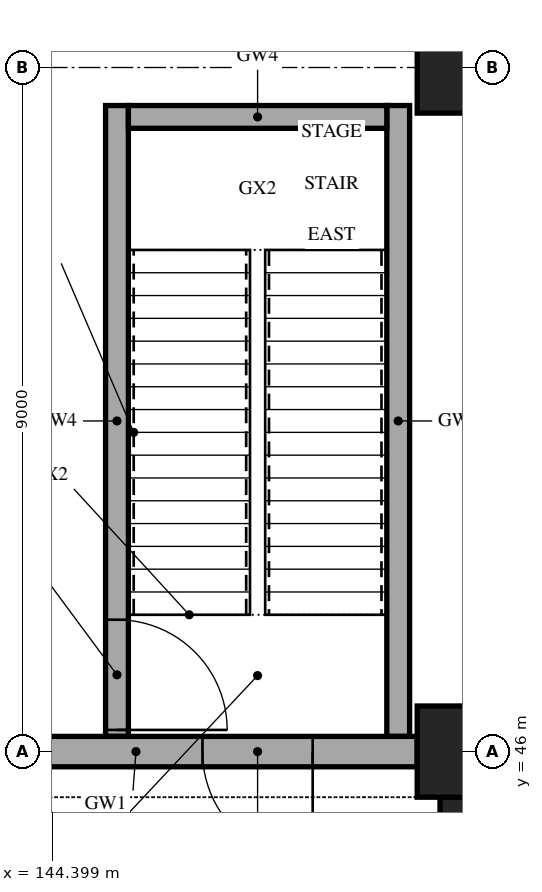
"""IFC4 building model, lengths in metres.
Left out: names, types, materials, properties, quantities, classifications, styles, units other than length and angle.
Written with IfcOpenShell. Run it as: python <this file> out.ifc"""

import sys

from ifc_helpers import new_model, si_unit, direction, frame, frame_2d, origin, origin_2d, place, context, subcontext, project, spatial, rectangle, extrude, element, fill, save


model = new_model("IFC4")
c1 = context("Model", 3, precision=1e-05, world=origin(), true_north=direction((0.0, 1.0)))
c2 = subcontext(c1, "Body", "Model", "MODEL_VIEW")
j1 = project(units=[si_unit("LENGTHUNIT", "METRE"), si_unit("PLANEANGLEUNIT", "RADIAN")], contexts=[c1])
p1 = place(None, origin())
s1 = spatial("IfcSite", under=j1, at=p1, CompositionType="ELEMENT")
p2 = place(p1, origin())
s2 = spatial("IfcBuilding", under=s1, at=p2, CompositionType="ELEMENT")
p3 = place(p2, origin())
s3 = spatial("IfcBuildingStorey", under=s2, at=p3, CompositionType="ELEMENT", Elevation=0.0)
p4 = place(p3, frame((150.0, 44.9, -0.3), z_axis=(0.0, 0.0, 1.0), x_axis=(1.0, 0.0, 0.0)))
e1 = element("IfcColumn", 1, at=p4, inside=s3, PredefinedType="COLUMN", context=c2, shape_type="SweptSolid", body=[
    extrude(rectangle(XDim=1.0, YDim=1.0, at=origin_2d()), origin(), (0.0, 0.0, 1.0), 5.3),
])
for number, where, z_axis, x_axis in (
    (2, (150.0, 46.0, 0.0), (0.0, 0.0, 1.0), (1.0, 0.0, 0.0)),
    (3, (150.0, 55.0, 0.0), (0.0, 0.0, 1.0), (1.0, 0.0, 0.0)),
):
    element("IfcColumn", number, at=place(p3, frame(where, z_axis=z_axis, x_axis=x_axis)), inside=s3, PredefinedType="COLUMN", context=c2, shape_type="SweptSolid", body=[
        extrude(rectangle(XDim=1.6, YDim=1.2, at=origin_2d()), origin(), (0.0, 0.0, 1.0), 5.0),
    ])
p5 = place(p3, frame((145.25, 46.2, 0.0), z_axis=(0.0, 0.0, 1.0), x_axis=(0.0, 1.0, 0.0)))
e4 = element("IfcWall", 4, at=p5, inside=s3, PredefinedType="SHEAR", context=c2, shape_type="SweptSolid", body=[
    extrude(rectangle(XDim=8.3, YDim=0.3, at=frame_2d((4.15, 0.0))), origin(), (0.0, 0.0, 1.0), 5.0),
])
p6 = place(p5, frame((0.085, 0.0, 0.0)))
e5 = element("IfcOpeningElement", 5, at=p6, cuts=e4, PredefinedType="OPENING", context=c2, shape_type="SweptSolid", body=[
    extrude(rectangle(XDim=1.45, YDim=2.1, at=frame_2d((0.725, 1.05))), frame((0.0, 0.16, 0.0), z_axis=(0.0, -1.0, 0.0), x_axis=(1.0, 0.0, 0.0)), (0.0, 0.0, 1.0), 0.32),
])
p7 = place(p3, frame((148.95, 46.2, 0.0), z_axis=(0.0, 0.0, 1.0), x_axis=(0.0, 1.0, 0.0)))
e6 = element("IfcWall", 6, at=p7, inside=s3, PredefinedType="SHEAR", context=c2, shape_type="SweptSolid", body=[
    extrude(rectangle(XDim=8.3, YDim=0.3, at=frame_2d((4.15, 0.0))), origin(), (0.0, 0.0, 1.0), 5.0),
])
p8 = place(p3, frame((145.4, 54.35, 0.0), z_axis=(0.0, 0.0, 1.0), x_axis=(1.0, 0.0, 0.0)))
e7 = element("IfcWall", 7, at=p8, inside=s3, PredefinedType="SHEAR", context=c2, shape_type="SweptSolid", body=[
    extrude(rectangle(XDim=3.4, YDim=0.3, at=frame_2d((1.7, 0.0))), origin(), (0.0, 0.0, 1.0), 5.0),
])
p9 = place(p3, frame((141.8, 46.0, 0.0), z_axis=(0.0, 0.0, 1.0), x_axis=(1.0, 0.0, 0.0)))
e8 = element("IfcWall", 8, at=p9, inside=s3, PredefinedType="SOLIDWALL", context=c2, shape_type="SweptSolid", body=[
    extrude(rectangle(XDim=7.4, YDim=0.4, at=frame_2d((3.7, 0.0))), origin(), (0.0, 0.0, 1.0), 4.4),
])
p10 = place(p9, frame((4.575, 0.0, 0.0)))
e9 = element("IfcOpeningElement", 9, at=p10, cuts=e8, PredefinedType="OPENING", context=c2, shape_type="SweptSolid", body=[
    extrude(rectangle(XDim=1.45, YDim=2.1, at=frame_2d((0.725, 1.05))), frame((0.0, 0.21, 0.0), z_axis=(0.0, -1.0, 0.0), x_axis=(1.0, 0.0, 0.0)), (0.0, 0.0, 1.0), 0.42),
])
p11 = place(p10, frame((1.45, 0.0, 0.0), z_axis=(0.0, 0.0, 1.0), x_axis=(-1.0, 0.0, 0.0)))
e10 = element("IfcDoor", 10, at=p11, inside=s3, OperationType="SINGLE_SWING_LEFT", PredefinedType="DOOR", context=c2, shape_type="SweptSolid", body=[
    extrude(rectangle(XDim=1.45, YDim=2.1, at=frame_2d((0.725, 1.05))), frame((0.0, 0.025, 0.0), z_axis=(0.0, -1.0, 0.0), x_axis=(1.0, 0.0, 0.0)), (0.0, 0.0, 1.0), 0.05),
])
fill(e9, e10)
p12 = place(p6, frame((1.45, 0.0, 0.0), z_axis=(0.0, 0.0, 1.0), x_axis=(-1.0, 0.0, 0.0)))
e11 = element("IfcDoor", 11, at=p12, inside=s3, OperationType="SINGLE_SWING_RIGHT", PredefinedType="DOOR", context=c2, shape_type="SweptSolid", body=[
    extrude(rectangle(XDim=1.45, YDim=2.1, at=frame_2d((0.725, 1.05))), frame((0.0, 0.025, 0.0), z_axis=(0.0, -1.0, 0.0), x_axis=(1.0, 0.0, 0.0)), (0.0, 0.0, 1.0), 0.05),
])
fill(e5, e11)
save(model, sys.argv[1])
